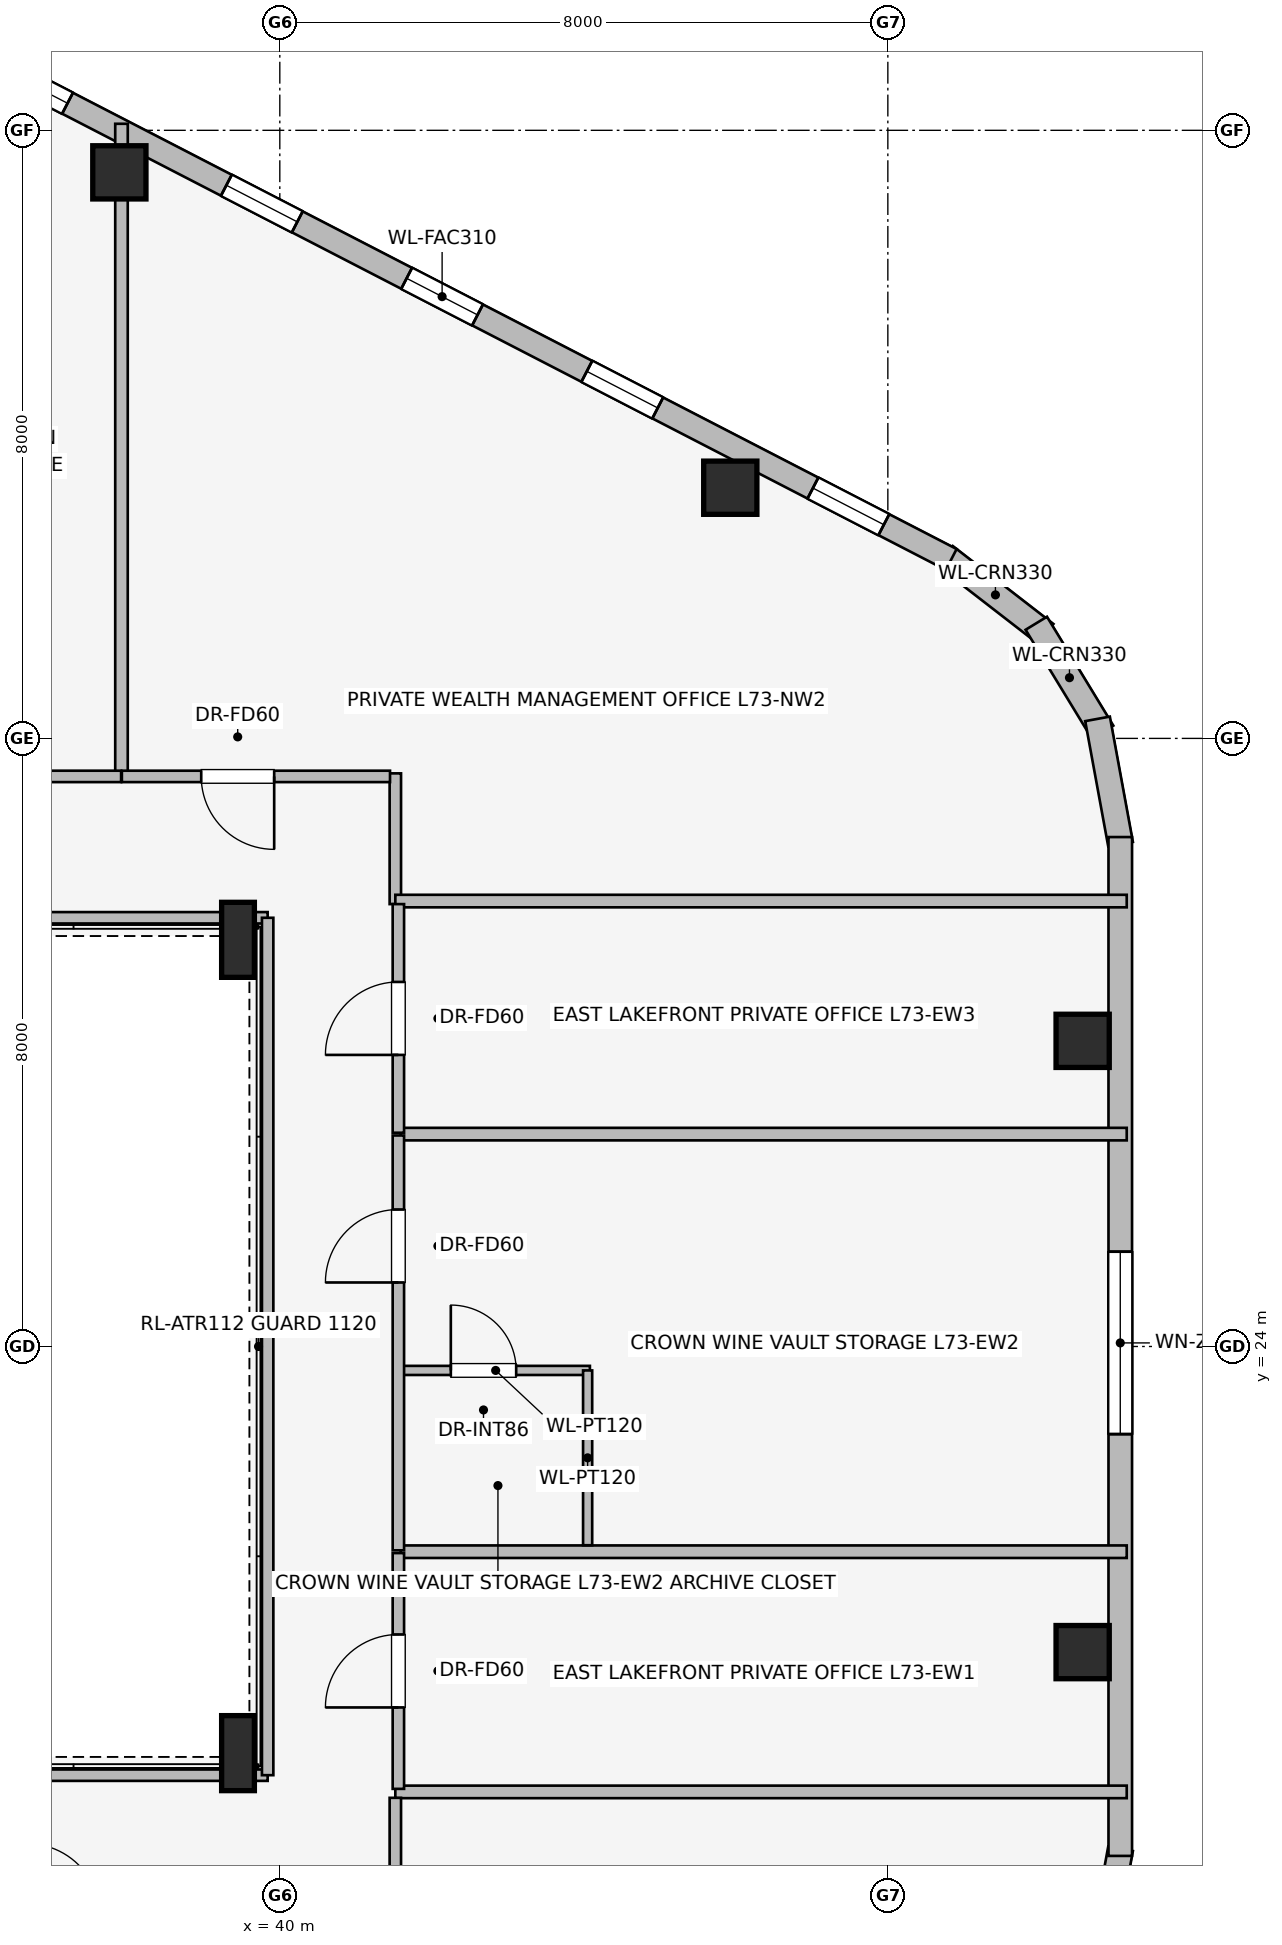
"""IFC4 building model, lengths in metres.
Left out: names, types, materials, properties, quantities, classifications, styles, units other than length and angle.
Written with IfcOpenShell. Run it as: python <this file> out.ifc"""

import sys

from ifc_helpers import new_model, si_unit, direction, frame, frame_2d, origin, origin_2d, place, context, subcontext, project, spatial, rectangle, i_section, extrude, element, fill, save


model = new_model("IFC4")
c1 = context("Model", 3, precision=1e-05, world=origin(), true_north=direction((0.0, 1.0)))
c2 = subcontext(c1, "Body", "Model", "MODEL_VIEW")
j1 = project(units=[si_unit("LENGTHUNIT", "METRE"), si_unit("PLANEANGLEUNIT", "RADIAN")], contexts=[c1])
p1 = place(None, origin())
s1 = spatial("IfcSite", under=j1, at=p1, CompositionType="ELEMENT")
p2 = place(p1, origin())
s2 = spatial("IfcBuilding", under=s1, at=p2, CompositionType="ELEMENT")
p3 = place(p2, frame((0.0, 0.0, 266.75)))
s3 = spatial("IfcBuildingStorey", under=s2, at=p3, CompositionType="ELEMENT", Elevation=266.75)
for number, where, z_axis, x_axis in (
    (1, (45.927, 35.298, 0.0), (0.0, 0.0, 1.0), (1.0, 0.0, 0.0)),
    (2, (37.889, 39.447, 0.0), (0.0, 0.0, 1.0), (1.0, 0.0, 0.0)),
    (3, (50.563, 19.979, 0.0), (0.0, 0.0, 1.0), (1.0, 0.0, 0.0)),
    (4, (50.563, 28.021, 0.0), (0.0, 0.0, 1.0), (1.0, 0.0, 0.0)),
):
    element("IfcColumn", number, at=place(p3, frame(where, z_axis=z_axis, x_axis=x_axis)), inside=s3, PredefinedType="COLUMN", context=c2, shape_type="SweptSolid", body=[
        extrude(rectangle(XDim=0.7, YDim=0.7, at=origin_2d()), origin(), (0.0, 0.0, 1.0), 3.55),
    ])
for number, where, z_axis, x_axis in (
    (5, (39.45, 18.65, 0.0), (0.0, 0.0, 1.0), (1.0, 0.0, 0.0)),
    (6, (39.45, 29.35, 0.0), (0.0, 0.0, 1.0), (1.0, 0.0, 0.0)),
):
    element("IfcColumn", number, at=place(p3, frame(where, z_axis=z_axis, x_axis=x_axis)), inside=s3, PredefinedType="COLUMN", context=c2, shape_type="SweptSolid", body=[
        extrude(i_section(OverallWidth=0.431, OverallDepth=0.987, WebThickness=0.034, FlangeThickness=0.062, at=origin_2d()), origin(), (0.0, 0.0, 1.0), 3.55),
    ])
p4 = place(p3, frame((48.753, 34.401, 0.0), z_axis=(0.0, 0.0, 1.0), x_axis=(0.790691856293, -0.61221433207, 0.0)))
e7 = element("IfcWall", 7, at=p4, inside=s3, PredefinedType="STANDARD", context=c2, shape_type="SweptSolid", body=[
    extrude(rectangle(XDim=1.676, YDim=0.33, at=frame_2d((0.838, 0.0))), origin(), (0.0, 0.0, 1.0), 3.24),
])
p5 = place(p3, frame((49.953, 33.515, 0.0), z_axis=(0.0, 0.0, 1.0), x_axis=(0.520325409202, -0.853968072318, 0.0)))
e8 = element("IfcWall", 8, at=p5, inside=s3, PredefinedType="STANDARD", context=c2, shape_type="SweptSolid", body=[
    extrude(rectangle(XDim=1.678, YDim=0.33, at=frame_2d((0.839, 0.0))), origin(), (0.0, 0.0, 1.0), 3.24),
])
p6 = place(p3, frame((50.759, 32.257, 0.0), z_axis=(0.0, 0.0, 1.0), x_axis=(0.180691763044, -0.983539773862, 0.0)))
e9 = element("IfcWall", 9, at=p6, inside=s3, PredefinedType="STANDARD", context=c2, shape_type="SweptSolid", body=[
    extrude(rectangle(XDim=1.677, YDim=0.33, at=frame_2d((0.838, 0.0))), origin(), (0.0, 0.0, 1.0), 3.24),
])
p7 = place(p3, frame((35.437, 41.27, 0.0), z_axis=(0.0, 0.0, 1.0), x_axis=(0.888581481622, -0.458718814218, 0.0)))
e10 = element("IfcWall", 10, at=p7, inside=s3, PredefinedType="STANDARD", context=c2, shape_type="SweptSolid", body=[
    extrude(rectangle(XDim=15.077, YDim=0.31, at=frame_2d((7.539, 0.0))), origin(), (0.0, 0.0, 1.0), 3.24),
])
p8 = place(p7, frame((0.942, 0.0, 0.75)))
e11 = element("IfcOpeningElement", 11, at=p8, cuts=e10, PredefinedType="OPENING", context=c2, shape_type="SweptSolid", body=[
    extrude(rectangle(XDim=1.05, YDim=1.4, at=frame_2d((0.525, 0.7))), frame((0.0, 0.165, 0.0), z_axis=(0.0, -1.0, 0.0), x_axis=(1.0, 0.0, 0.0)), (0.0, 0.0, 1.0), 0.33),
])
p9 = place(p7, frame((4.344, 0.0, 0.75)))
e12 = element("IfcOpeningElement", 12, at=p9, cuts=e10, PredefinedType="OPENING", context=c2, shape_type="SweptSolid", body=[
    extrude(rectangle(XDim=1.05, YDim=1.4, at=frame_2d((0.525, 0.7))), frame((0.0, 0.165, 0.0), z_axis=(0.0, -1.0, 0.0), x_axis=(1.0, 0.0, 0.0)), (0.0, 0.0, 1.0), 0.33),
])
p10 = place(p7, frame((7.013, 0.0, 0.75)))
e13 = element("IfcOpeningElement", 13, at=p10, cuts=e10, PredefinedType="OPENING", context=c2, shape_type="SweptSolid", body=[
    extrude(rectangle(XDim=1.05, YDim=1.4, at=frame_2d((0.525, 0.7))), frame((0.0, 0.165, 0.0), z_axis=(0.0, -1.0, 0.0), x_axis=(1.0, 0.0, 0.0)), (0.0, 0.0, 1.0), 0.33),
])
p11 = place(p7, frame((9.681, 0.0, 0.75)))
e14 = element("IfcOpeningElement", 14, at=p11, cuts=e10, PredefinedType="OPENING", context=c2, shape_type="SweptSolid", body=[
    extrude(rectangle(XDim=1.05, YDim=1.4, at=frame_2d((0.525, 0.7))), frame((0.0, 0.165, 0.0), z_axis=(0.0, -1.0, 0.0), x_axis=(1.0, 0.0, 0.0)), (0.0, 0.0, 1.0), 0.33),
])
p12 = place(p7, frame((13.029, 0.0, 0.75)))
e15 = element("IfcOpeningElement", 15, at=p12, cuts=e10, PredefinedType="OPENING", context=c2, shape_type="SweptSolid", body=[
    extrude(rectangle(XDim=1.05, YDim=1.4, at=frame_2d((0.525, 0.7))), frame((0.0, 0.165, 0.0), z_axis=(0.0, -1.0, 0.0), x_axis=(1.0, 0.0, 0.0)), (0.0, 0.0, 1.0), 0.33),
])
p13 = place(p3, frame((51.062, 17.392, 0.0), z_axis=(0.0, 0.0, 1.0), x_axis=(-0.180691763044, -0.983539773862, 0.0)))
e16 = element("IfcWall", 16, at=p13, inside=s3, PredefinedType="STANDARD", context=c2, shape_type="SweptSolid", body=[
    extrude(rectangle(XDim=1.677, YDim=0.33, at=frame_2d((0.838, 0.0))), origin(), (0.0, 0.0, 1.0), 3.24),
])
p14 = place(p3, frame((51.058, 30.702, 0.0), z_axis=(0.0, 0.0, 1.0), x_axis=(0.0, -1.0, 0.0)))
e17 = element("IfcWall", 17, at=p14, inside=s3, PredefinedType="STANDARD", context=c2, shape_type="SweptSolid", body=[
    extrude(rectangle(XDim=13.404, YDim=0.31, at=frame_2d((6.702, 0.0))), origin(), (0.0, 0.0, 1.0), 3.24),
])
p15 = place(p14, frame((5.455, 0.0, 0.75)))
e18 = element("IfcOpeningElement", 18, at=p15, cuts=e17, PredefinedType="OPENING", context=c2, shape_type="SweptSolid", body=[
    extrude(rectangle(XDim=2.4, YDim=1.6, at=frame_2d((1.2, 0.8))), frame((0.0, 0.165, 0.0), z_axis=(0.0, -1.0, 0.0), x_axis=(1.0, 0.0, 0.0)), (0.0, 0.0, 1.0), 0.33),
])
p16 = place(p3, frame((27.675, 18.36, 0.0), z_axis=(0.0, 0.0, 1.0), x_axis=(1.0, 0.0, 0.0)))
e19 = element("IfcWall", 19, at=p16, inside=s3, PredefinedType="PARTITIONING", context=c2, shape_type="SweptSolid", body=[
    extrude(rectangle(XDim=12.165, YDim=0.15, at=frame_2d((6.083, 0.0))), origin(), (0.0, 0.0, 1.0), 2.381),
])
p17 = place(p3, frame((39.84, 29.64, 0.0), z_axis=(0.0, 0.0, 1.0), x_axis=(-1.0, 0.0, 0.0)))
e20 = element("IfcWall", 20, at=p17, inside=s3, PredefinedType="PARTITIONING", context=c2, shape_type="SweptSolid", body=[
    extrude(rectangle(XDim=12.203, YDim=0.15, at=frame_2d((6.102, 0.0))), origin(), (0.0, 0.0, 1.0), 2.381),
])
p18 = place(p3, frame((39.84, 18.36, 0.0), z_axis=(0.0, 0.0, 1.0), x_axis=(0.0, 1.0, 0.0)))
e21 = element("IfcWall", 21, at=p18, inside=s3, PredefinedType="PARTITIONING", context=c2, shape_type="SweptSolid", body=[
    extrude(rectangle(XDim=11.28, YDim=0.15, at=frame_2d((5.64, 0.0))), origin(), (0.0, 0.0, 1.0), 3.24),
])
p19 = place(p3, frame((41.52, 29.82, 0.0), z_axis=(0.0, 0.0, 1.0), x_axis=(0.0, 1.0, 0.0)))
e22 = element("IfcWall", 22, at=p19, inside=s3, PredefinedType="PARTITIONING", context=c2, shape_type="SweptSolid", body=[
    extrude(rectangle(XDim=1.72, YDim=0.15, at=frame_2d((0.86, 0.0))), origin(), (0.0, 0.0, 1.0), 3.24),
])
p20 = place(p3, frame((37.917, 31.51, 0.0), z_axis=(0.0, 0.0, 1.0), x_axis=(0.0, 1.0, 0.0)))
e23 = element("IfcWall", 23, at=p20, inside=s3, PredefinedType="PARTITIONING", context=c2, shape_type="SweptSolid", body=[
    extrude(rectangle(XDim=8.576, YDim=0.165, at=frame_2d((4.288, 0.0))), origin(), (0.0, 0.0, 1.0), 2.629),
])
p21 = place(p3, frame((37.912, 31.5, 0.0), z_axis=(0.0, 0.0, 1.0), x_axis=(-1.0, 0.0, 0.0)))
e24 = element("IfcWall", 24, at=p21, inside=s3, PredefinedType="PARTITIONING", context=c2, shape_type="SweptSolid", body=[
    extrude(rectangle(XDim=3.622, YDim=0.15, at=frame_2d((1.811, 0.0))), origin(), (0.0, 0.0, 1.0), 3.24),
])
p22 = place(p21, frame((1.212, 0.0, 0.0)))
e25 = element("IfcOpeningElement", 25, at=p22, cuts=e24, PredefinedType="OPENING", context=c2, shape_type="SweptSolid", body=[
    extrude(rectangle(XDim=0.96, YDim=2.0, at=frame_2d((0.48, 1.0))), frame((0.0, 0.085, 0.0), z_axis=(0.0, -1.0, 0.0), x_axis=(1.0, 0.0, 0.0)), (0.0, 0.0, 1.0), 0.17),
])
p23 = place(p3, frame((41.45, 31.5, 0.0), z_axis=(0.0, 0.0, 1.0), x_axis=(-1.0, 0.0, 0.0)))
e26 = element("IfcWall", 26, at=p23, inside=s3, PredefinedType="PARTITIONING", context=c2, shape_type="SweptSolid", body=[
    extrude(rectangle(XDim=3.528, YDim=0.15, at=frame_2d((1.764, 0.0))), origin(), (0.0, 0.0, 1.0), 3.24),
])
p24 = place(p23, frame((1.524, 0.0, 0.0)))
e27 = element("IfcOpeningElement", 27, at=p24, cuts=e26, PredefinedType="OPENING", context=c2, shape_type="SweptSolid", body=[
    extrude(rectangle(XDim=0.96, YDim=2.0, at=frame_2d((0.48, 1.0))), frame((0.0, 0.085, 0.0), z_axis=(0.0, -1.0, 0.0), x_axis=(1.0, 0.0, 0.0)), (0.0, 0.0, 1.0), 0.17),
])
for number, where, z_axis, x_axis in (
    (28, (41.52, 18.14, 0.0), (0.0, 0.0, 1.0), (1.0, 0.0, 0.0)),
    (29, (41.52, 29.86, 0.0), (0.0, 0.0, 1.0), (1.0, 0.0, 0.0)),
):
    element("IfcWall", number, at=place(p3, frame(where, z_axis=z_axis, x_axis=x_axis)), inside=s3, PredefinedType="PARTITIONING", context=c2, shape_type="SweptSolid", body=[
        extrude(rectangle(XDim=9.623, YDim=0.165, at=frame_2d((4.812, 0.0))), origin(), (0.0, 0.0, 1.0), 3.24),
    ])
for number, where, z_axis, x_axis in (
    (30, (41.59, 21.3, 0.0), (0.0, 0.0, 1.0), (1.0, 0.0, 0.0)),
    (31, (41.59, 26.794, 0.0), (0.0, 0.0, 1.0), (1.0, 0.0, 0.0)),
):
    element("IfcWall", number, at=place(p3, frame(where, z_axis=z_axis, x_axis=x_axis)), inside=s3, PredefinedType="PARTITIONING", context=c2, shape_type="SweptSolid", body=[
        extrude(rectangle(XDim=9.553, YDim=0.165, at=frame_2d((4.776, 0.0))), origin(), (0.0, 0.0, 1.0), 3.24),
    ])
p25 = place(p3, frame((41.56, 18.18, 0.0), z_axis=(0.0, 0.0, 1.0), x_axis=(0.0, 1.0, 0.0)))
e32 = element("IfcWall", 32, at=p25, inside=s3, PredefinedType="PARTITIONING", context=c2, shape_type="SweptSolid", body=[
    extrude(rectangle(XDim=3.102, YDim=0.15, at=frame_2d((1.551, 0.0))), origin(), (0.0, 0.0, 1.0), 3.24),
])
p26 = place(p25, frame((1.071, 0.0, 0.0)))
e33 = element("IfcOpeningElement", 33, at=p26, cuts=e32, PredefinedType="OPENING", context=c2, shape_type="SweptSolid", body=[
    extrude(rectangle(XDim=0.96, YDim=2.0, at=frame_2d((0.48, 1.0))), frame((0.0, 0.085, 0.0), z_axis=(0.0, -1.0, 0.0), x_axis=(1.0, 0.0, 0.0)), (0.0, 0.0, 1.0), 0.17),
])
p27 = place(p3, frame((41.6, 23.685, 0.0), z_axis=(0.0, 0.0, 1.0), x_axis=(1.0, 0.0, 0.0)))
e34 = element("IfcWall", 34, at=p27, inside=s3, PredefinedType="PARTITIONING", context=c2, shape_type="SweptSolid", body=[
    extrude(rectangle(XDim=2.48, YDim=0.12, at=frame_2d((1.24, 0.0))), origin(), (0.0, 0.0, 1.0), 3.24),
])
p28 = place(p27, frame((0.65, 0.0, 0.0)))
e35 = element("IfcOpeningElement", 35, at=p28, cuts=e34, PredefinedType="OPENING", context=c2, shape_type="SweptSolid", body=[
    extrude(rectangle(XDim=0.86, YDim=2.0, at=frame_2d((0.43, 1.0))), frame((0.0, 0.07, 0.0), z_axis=(0.0, -1.0, 0.0), x_axis=(1.0, 0.0, 0.0)), (0.0, 0.0, 1.0), 0.14),
])
p29 = place(p3, frame((44.05, 21.385, 0.0), z_axis=(0.0, 0.0, 1.0), x_axis=(0.0, 1.0, 0.0)))
e36 = element("IfcWall", 36, at=p29, inside=s3, PredefinedType="PARTITIONING", context=c2, shape_type="SweptSolid", body=[
    extrude(rectangle(XDim=2.3, YDim=0.12, at=frame_2d((1.15, 0.0))), origin(), (0.0, 0.0, 1.0), 2.837),
])
p30 = place(p3, frame((41.56, 21.318, 0.0), z_axis=(0.0, 0.0, 1.0), x_axis=(0.0, 1.0, 0.0)))
e37 = element("IfcWall", 37, at=p30, inside=s3, PredefinedType="PARTITIONING", context=c2, shape_type="SweptSolid", body=[
    extrude(rectangle(XDim=5.458, YDim=0.15, at=frame_2d((2.729, 0.0))), origin(), (0.0, 0.0, 1.0), 3.24),
])
p31 = place(p30, frame((3.524, 0.0, 0.0)))
e38 = element("IfcOpeningElement", 38, at=p31, cuts=e37, PredefinedType="OPENING", context=c2, shape_type="SweptSolid", body=[
    extrude(rectangle(XDim=0.96, YDim=2.0, at=frame_2d((0.48, 1.0))), frame((0.0, 0.085, 0.0), z_axis=(0.0, -1.0, 0.0), x_axis=(1.0, 0.0, 0.0)), (0.0, 0.0, 1.0), 0.17),
])
p32 = place(p3, frame((41.56, 26.812, 0.0), z_axis=(0.0, 0.0, 1.0), x_axis=(0.0, 1.0, 0.0)))
e39 = element("IfcWall", 39, at=p32, inside=s3, PredefinedType="PARTITIONING", context=c2, shape_type="SweptSolid", body=[
    extrude(rectangle(XDim=3.008, YDim=0.15, at=frame_2d((1.504, 0.0))), origin(), (0.0, 0.0, 1.0), 3.24),
])
p33 = place(p32, frame((1.024, 0.0, 0.0)))
e40 = element("IfcOpeningElement", 40, at=p33, cuts=e39, PredefinedType="OPENING", context=c2, shape_type="SweptSolid", body=[
    extrude(rectangle(XDim=0.96, YDim=2.0, at=frame_2d((0.48, 1.0))), frame((0.0, 0.085, 0.0), z_axis=(0.0, -1.0, 0.0), x_axis=(1.0, 0.0, 0.0)), (0.0, 0.0, 1.0), 0.17),
])
p34 = place(p3, frame((41.52, 16.46, 0.0), z_axis=(0.0, 0.0, 1.0), x_axis=(0.0, 1.0, 0.0)))
e41 = element("IfcWall", 41, at=p34, inside=s3, PredefinedType="PARTITIONING", context=c2, shape_type="SweptSolid", body=[
    extrude(rectangle(XDim=1.602, YDim=0.15, at=frame_2d((0.801, 0.0))), origin(), (0.0, 0.0, 1.0), 3.24),
])
p35 = place(p8, origin())
e42 = element("IfcWindow", 42, at=p35, inside=s3, PartitioningType="SINGLE_PANEL", PredefinedType="WINDOW", context=c2, shape_type="SweptSolid", body=[
    extrude(rectangle(XDim=1.05, YDim=1.4, at=frame_2d((0.525, 0.7))), frame((0.0, 0.03, 0.0), z_axis=(0.0, -1.0, 0.0), x_axis=(1.0, 0.0, 0.0)), (0.0, 0.0, 1.0), 0.06),
])
fill(e11, e42)
p36 = place(p9, origin())
e43 = element("IfcWindow", 43, at=p36, inside=s3, PartitioningType="SINGLE_PANEL", PredefinedType="WINDOW", context=c2, shape_type="SweptSolid", body=[
    extrude(rectangle(XDim=1.05, YDim=1.4, at=frame_2d((0.525, 0.7))), frame((0.0, 0.03, 0.0), z_axis=(0.0, -1.0, 0.0), x_axis=(1.0, 0.0, 0.0)), (0.0, 0.0, 1.0), 0.06),
])
fill(e12, e43)
p37 = place(p10, origin())
e44 = element("IfcWindow", 44, at=p37, inside=s3, PartitioningType="SINGLE_PANEL", PredefinedType="WINDOW", context=c2, shape_type="SweptSolid", body=[
    extrude(rectangle(XDim=1.05, YDim=1.4, at=frame_2d((0.525, 0.7))), frame((0.0, 0.03, 0.0), z_axis=(0.0, -1.0, 0.0), x_axis=(1.0, 0.0, 0.0)), (0.0, 0.0, 1.0), 0.06),
])
fill(e13, e44)
p38 = place(p11, origin())
e45 = element("IfcWindow", 45, at=p38, inside=s3, PartitioningType="SINGLE_PANEL", PredefinedType="WINDOW", context=c2, shape_type="SweptSolid", body=[
    extrude(rectangle(XDim=1.05, YDim=1.4, at=frame_2d((0.525, 0.7))), frame((0.0, 0.03, 0.0), z_axis=(0.0, -1.0, 0.0), x_axis=(1.0, 0.0, 0.0)), (0.0, 0.0, 1.0), 0.06),
])
fill(e14, e45)
p39 = place(p12, origin())
e46 = element("IfcWindow", 46, at=p39, inside=s3, PartitioningType="SINGLE_PANEL", PredefinedType="WINDOW", context=c2, shape_type="SweptSolid", body=[
    extrude(rectangle(XDim=1.05, YDim=1.4, at=frame_2d((0.525, 0.7))), frame((0.0, 0.03, 0.0), z_axis=(0.0, -1.0, 0.0), x_axis=(1.0, 0.0, 0.0)), (0.0, 0.0, 1.0), 0.06),
])
fill(e15, e46)
p40 = place(p15, origin())
e47 = element("IfcWindow", 47, at=p40, inside=s3, PartitioningType="SINGLE_PANEL", PredefinedType="WINDOW", context=c2, shape_type="SweptSolid", body=[
    extrude(rectangle(XDim=2.4, YDim=1.6, at=frame_2d((1.2, 0.8))), frame((0.0, 0.03, 0.0), z_axis=(0.0, -1.0, 0.0), x_axis=(1.0, 0.0, 0.0)), (0.0, 0.0, 1.0), 0.06),
])
fill(e18, e47)
p41 = place(p24, origin())
e48 = element("IfcDoor", 48, at=p41, inside=s3, OperationType="SINGLE_SWING_LEFT", PredefinedType="DOOR", context=c2, shape_type="SweptSolid", body=[
    extrude(rectangle(XDim=0.96, YDim=2.0, at=frame_2d((0.48, 1.0))), frame((0.0, 0.025, 0.0), z_axis=(0.0, -1.0, 0.0), x_axis=(1.0, 0.0, 0.0)), (0.0, 0.0, 1.0), 0.05),
])
fill(e27, e48)
p42 = place(p26, origin())
e49 = element("IfcDoor", 49, at=p42, inside=s3, OperationType="SINGLE_SWING_LEFT", PredefinedType="DOOR", context=c2, shape_type="SweptSolid", body=[
    extrude(rectangle(XDim=0.96, YDim=2.0, at=frame_2d((0.48, 1.0))), frame((0.0, 0.025, 0.0), z_axis=(0.0, -1.0, 0.0), x_axis=(1.0, 0.0, 0.0)), (0.0, 0.0, 1.0), 0.05),
])
fill(e33, e49)
p43 = place(p28, origin())
e50 = element("IfcDoor", 50, at=p43, inside=s3, OperationType="SINGLE_SWING_LEFT", PredefinedType="DOOR", context=c2, shape_type="SweptSolid", body=[
    extrude(rectangle(XDim=0.86, YDim=2.0, at=frame_2d((0.43, 1.0))), frame((0.0, 0.025, 0.0), z_axis=(0.0, -1.0, 0.0), x_axis=(1.0, 0.0, 0.0)), (0.0, 0.0, 1.0), 0.05),
])
fill(e35, e50)
p44 = place(p31, origin())
e51 = element("IfcDoor", 51, at=p44, inside=s3, OperationType="SINGLE_SWING_LEFT", PredefinedType="DOOR", context=c2, shape_type="SweptSolid", body=[
    extrude(rectangle(XDim=0.96, YDim=2.0, at=frame_2d((0.48, 1.0))), frame((0.0, 0.025, 0.0), z_axis=(0.0, -1.0, 0.0), x_axis=(1.0, 0.0, 0.0)), (0.0, 0.0, 1.0), 0.05),
])
fill(e38, e51)
p45 = place(p33, origin())
e52 = element("IfcDoor", 52, at=p45, inside=s3, OperationType="SINGLE_SWING_LEFT", PredefinedType="DOOR", context=c2, shape_type="SweptSolid", body=[
    extrude(rectangle(XDim=0.96, YDim=2.0, at=frame_2d((0.48, 1.0))), frame((0.0, 0.025, 0.0), z_axis=(0.0, -1.0, 0.0), x_axis=(1.0, 0.0, 0.0)), (0.0, 0.0, 1.0), 0.05),
])
fill(e40, e52)
save(model, sys.argv[1])
